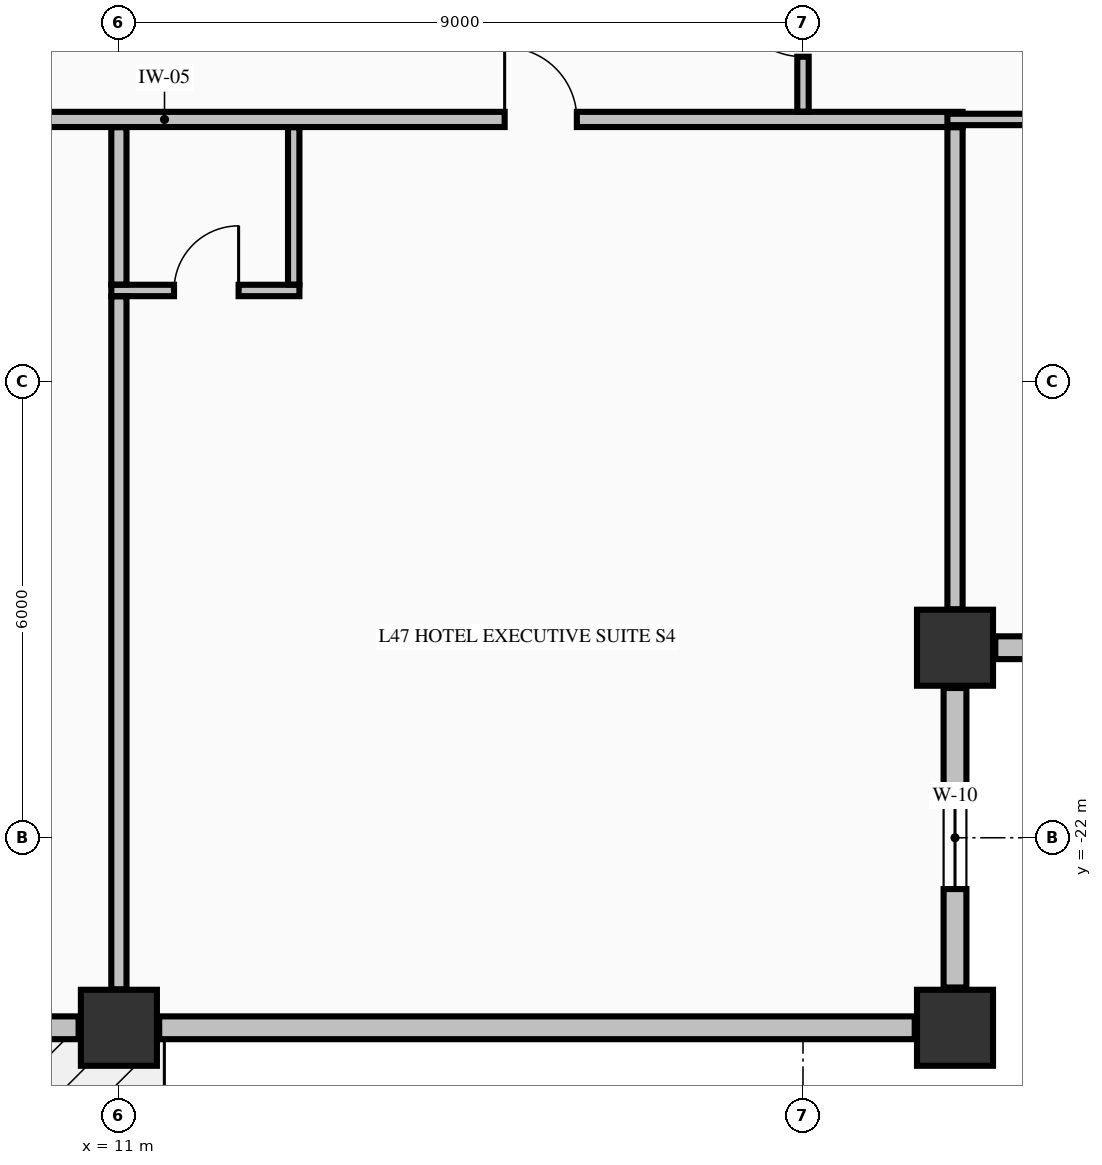
"""IFC4 building model, lengths in metres.
Left out: names, types, materials, properties, quantities, classifications, styles, units other than length and angle.
Written with IfcOpenShell. Run it as: python <this file> out.ifc"""

import sys

from ifc_helpers import new_model, si_unit, direction, frame, frame_2d, origin, origin_2d, place, context, subcontext, project, spatial, rectangle, extrude, element, fill, save


model = new_model("IFC4")
c1 = context("Model", 3, precision=1e-05, world=origin(), true_north=direction((0.0, 1.0)))
c2 = subcontext(c1, "Body", "Model", "MODEL_VIEW")
j1 = project(units=[si_unit("LENGTHUNIT", "METRE"), si_unit("PLANEANGLEUNIT", "RADIAN")], contexts=[c1])
p1 = place(None, origin())
s1 = spatial("IfcSite", under=j1, at=p1, CompositionType="ELEMENT")
p2 = place(p1, origin())
s2 = spatial("IfcBuilding", under=s1, at=p2, CompositionType="ELEMENT")
p3 = place(p2, frame((0.0, 0.0, 183.06)))
s3 = spatial("IfcBuildingStorey", under=s2, at=p3, CompositionType="ELEMENT", Elevation=183.06)
for number, where, z_axis, x_axis in (
    (1, (11.0, -24.5, -0.25), (0.0, 0.0, 1.0), (1.0, 0.0, 0.0)),
    (2, (22.0, -24.5, -0.25), (0.0, 0.0, 1.0), (1.0, 0.0, 0.0)),
    (3, (22.0, -19.5, -0.25), (0.0, 0.0, 1.0), (1.0, 0.0, 0.0)),
):
    element("IfcColumn", number, at=place(p3, frame(where, z_axis=z_axis, x_axis=x_axis)), inside=s3, PredefinedType="COLUMN", context=c2, shape_type="SweptSolid", body=[
        extrude(rectangle(XDim=1.0, YDim=1.0, at=origin_2d()), origin(), (0.0, 0.0, 1.0), 3.225),
    ])
p4 = place(p3, frame((22.0, -23.97, 0.0), z_axis=(0.0, 0.0, 1.0), x_axis=(0.0, 1.0, 0.0)))
e4 = element("IfcWall", 4, at=p4, inside=s3, PredefinedType="STANDARD", context=c2, shape_type="SweptSolid", body=[
    extrude(rectangle(XDim=3.94, YDim=0.3, at=frame_2d((1.97, 0.0))), origin(), (0.0, 0.0, 1.0), 2.367),
])
p5 = place(p4, frame((1.295, 0.0, 0.68)))
e5 = element("IfcOpeningElement", 5, at=p5, cuts=e4, PredefinedType="OPENING", context=c2, shape_type="SweptSolid", body=[
    extrude(rectangle(XDim=1.35, YDim=1.42, at=frame_2d((0.675, 0.71))), frame((0.0, 0.16, 0.0), z_axis=(0.0, -1.0, 0.0), x_axis=(1.0, 0.0, 0.0)), (0.0, 0.0, 1.0), 0.32),
])
p6 = place(p3, frame((22.53, -19.5, 0.0), z_axis=(0.0, 0.0, 1.0), x_axis=(1.0, 0.0, 0.0)))
e6 = element("IfcWall", 6, at=p6, inside=s3, PredefinedType="STANDARD", context=c2, shape_type="SweptSolid", body=[
    extrude(rectangle(XDim=3.94, YDim=0.3, at=frame_2d((1.97, 0.0))), origin(), (0.0, 0.0, 1.0), 2.367),
])
p7 = place(p6, frame((1.295, 0.0, 0.68)))
e7 = element("IfcOpeningElement", 7, at=p7, cuts=e6, PredefinedType="OPENING", context=c2, shape_type="SweptSolid", body=[
    extrude(rectangle(XDim=1.35, YDim=1.42, at=frame_2d((0.675, 0.71))), frame((0.0, 0.16, 0.0), z_axis=(0.0, -1.0, 0.0), x_axis=(1.0, 0.0, 0.0)), (0.0, 0.0, 1.0), 0.32),
])
for number, where, z_axis, x_axis in (
    (8, (0.53, -24.5, 0.0), (0.0, 0.0, 1.0), (1.0, 0.0, 0.0)),
    (9, (11.53, -24.5, 0.0), (0.0, 0.0, 1.0), (1.0, 0.0, 0.0)),
):
    element("IfcWall", number, at=place(p3, frame(where, z_axis=z_axis, x_axis=x_axis)), inside=s3, PredefinedType="STANDARD", context=c2, shape_type="SweptSolid", body=[
        extrude(rectangle(XDim=9.94, YDim=0.3, at=frame_2d((4.97, 0.0))), origin(), (0.0, 0.0, 1.0), 2.367),
    ])
p8 = place(p3, frame((10.9, -14.8, 0.0), z_axis=(0.0, 0.0, 1.0), x_axis=(1.0, 0.0, 0.0)))
e10 = element("IfcWall", 10, at=p8, inside=s3, PredefinedType="PARTITIONING", context=c2, shape_type="SweptSolid", body=[
    extrude(rectangle(XDim=2.475, YDim=0.15, at=frame_2d((1.238, 0.0))), origin(), (0.0, 0.0, 1.0), 2.975),
])
p9 = place(p8, frame((0.825, 0.0, 0.0)))
e11 = element("IfcOpeningElement", 11, at=p9, cuts=e10, PredefinedType="OPENING", context=c2, shape_type="SweptSolid", body=[
    extrude(rectangle(XDim=0.85, YDim=2.1, at=frame_2d((0.425, 1.05))), frame((0.0, 0.085, 0.0), z_axis=(0.0, -1.0, 0.0), x_axis=(1.0, 0.0, 0.0)), (0.0, 0.0, 1.0), 0.17),
])
p10 = place(p3, frame((-17.1, -12.55, 0.0), z_axis=(0.0, 0.0, 1.0), x_axis=(1.0, 0.0, 0.0)))
e12 = element("IfcWall", 12, at=p10, inside=s3, PredefinedType="PARTITIONING", context=c2, shape_type="SweptSolid", body=[
    extrude(rectangle(XDim=39.2, YDim=0.2, at=frame_2d((19.6, 0.0))), origin(), (0.0, 0.0, 1.0), 2.975),
])
p11 = place(p10, frame((6.475, 0.0, 0.0)))
e13 = element("IfcOpeningElement", 13, at=p11, cuts=e12, PredefinedType="OPENING", context=c2, shape_type="SweptSolid", body=[
    extrude(rectangle(XDim=0.95, YDim=2.15, at=frame_2d((0.475, 1.075))), frame((0.0, 0.11, 0.0), z_axis=(0.0, -1.0, 0.0), x_axis=(1.0, 0.0, 0.0)), (0.0, 0.0, 1.0), 0.22),
])
p12 = place(p10, frame((13.525, 0.0, 0.0)))
e14 = element("IfcOpeningElement", 14, at=p12, cuts=e12, PredefinedType="OPENING", context=c2, shape_type="SweptSolid", body=[
    extrude(rectangle(XDim=0.95, YDim=2.15, at=frame_2d((0.475, 1.075))), frame((0.0, 0.11, 0.0), z_axis=(0.0, -1.0, 0.0), x_axis=(1.0, 0.0, 0.0)), (0.0, 0.0, 1.0), 0.22),
])
p13 = place(p10, frame((23.275, 0.0, 0.0)))
e15 = element("IfcOpeningElement", 15, at=p13, cuts=e12, PredefinedType="OPENING", context=c2, shape_type="SweptSolid", body=[
    extrude(rectangle(XDim=0.95, YDim=2.15, at=frame_2d((0.475, 1.075))), frame((0.0, 0.11, 0.0), z_axis=(0.0, -1.0, 0.0), x_axis=(1.0, 0.0, 0.0)), (0.0, 0.0, 1.0), 0.22),
])
p14 = place(p10, frame((33.175, 0.0, 0.0)))
e16 = element("IfcOpeningElement", 16, at=p14, cuts=e12, PredefinedType="OPENING", context=c2, shape_type="SweptSolid", body=[
    extrude(rectangle(XDim=0.95, YDim=2.15, at=frame_2d((0.475, 1.075))), frame((0.0, 0.11, 0.0), z_axis=(0.0, -1.0, 0.0), x_axis=(1.0, 0.0, 0.0)), (0.0, 0.0, 1.0), 0.22),
])
p15 = place(p3, frame((21.9, -12.55, 0.0), z_axis=(0.0, 0.0, 1.0), x_axis=(1.0, 0.0, 0.0)))
e17 = element("IfcWall", 17, at=p15, inside=s3, PredefinedType="PARTITIONING", context=c2, shape_type="SweptSolid", body=[
    extrude(rectangle(XDim=4.935, YDim=0.15, at=frame_2d((2.468, 0.0))), origin(), (0.0, 0.0, 1.0), 2.975),
])
p16 = place(p3, frame((11.0, -23.994, 0.0), z_axis=(0.0, 0.0, 1.0), x_axis=(0.0, 1.0, 0.0)))
e18 = element("IfcWall", 18, at=p16, inside=s3, PredefinedType="PARTITIONING", context=c2, shape_type="SweptSolid", body=[
    extrude(rectangle(XDim=9.116, YDim=0.2, at=frame_2d((4.558, 0.0))), origin(), (0.0, 0.0, 1.0), 2.167),
])
p17 = place(p3, frame((11.0, -14.722, 0.0), z_axis=(0.0, 0.0, 1.0), x_axis=(0.0, 1.0, 0.0)))
e19 = element("IfcWall", 19, at=p17, inside=s3, PredefinedType="PARTITIONING", context=c2, shape_type="SweptSolid", body=[
    extrude(rectangle(XDim=2.069, YDim=0.2, at=frame_2d((1.034, 0.0))), origin(), (0.0, 0.0, 1.0), 2.167),
])
p18 = place(p3, frame((13.3, -14.722, 0.0), z_axis=(0.0, 0.0, 1.0), x_axis=(0.0, 1.0, 0.0)))
e20 = element("IfcWall", 20, at=p18, inside=s3, PredefinedType="PARTITIONING", context=c2, shape_type="SweptSolid", body=[
    extrude(rectangle(XDim=2.069, YDim=0.15, at=frame_2d((1.034, 0.0))), origin(), (0.0, 0.0, 1.0), 2.975),
])
p19 = place(p3, frame((20.0, -12.447, 0.0), z_axis=(0.0, 0.0, 1.0), x_axis=(0.0, 1.0, 0.0)))
e21 = element("IfcWall", 21, at=p19, inside=s3, PredefinedType="PARTITIONING", context=c2, shape_type="SweptSolid", body=[
    extrude(rectangle(XDim=2.066, YDim=0.15, at=frame_2d((1.033, 0.0))), origin(), (0.0, 0.0, 1.0), 2.167),
])
p20 = place(p19, frame((0.722, 0.0, 0.0)))
e22 = element("IfcOpeningElement", 22, at=p20, cuts=e21, PredefinedType="OPENING", context=c2, shape_type="SweptSolid", body=[
    extrude(rectangle(XDim=0.95, YDim=2.02, at=frame_2d((0.475, 1.01))), frame((0.0, 0.085, 0.0), z_axis=(0.0, -1.0, 0.0), x_axis=(1.0, 0.0, 0.0)), (0.0, 0.0, 1.0), 0.17),
])
p21 = place(p3, frame((22.0, -18.994, 0.0), z_axis=(0.0, 0.0, 1.0), x_axis=(0.0, 1.0, 0.0)))
e23 = element("IfcWall", 23, at=p21, inside=s3, PredefinedType="PARTITIONING", context=c2, shape_type="SweptSolid", body=[
    extrude(rectangle(XDim=6.341, YDim=0.2, at=frame_2d((3.17, 0.0))), origin(), (0.0, 0.0, 1.0), 2.975),
])
p22 = place(p5, origin())
e24 = element("IfcWindow", 24, at=p22, inside=s3, PartitioningType="SINGLE_PANEL", PredefinedType="WINDOW", context=c2, shape_type="SweptSolid", body=[
    extrude(rectangle(XDim=1.35, YDim=1.42, at=frame_2d((0.675, 0.71))), frame((0.0, 0.03, 0.0), z_axis=(0.0, -1.0, 0.0), x_axis=(1.0, 0.0, 0.0)), (0.0, 0.0, 1.0), 0.06),
])
fill(e5, e24)
p23 = place(p14, origin())
e25 = element("IfcDoor", 25, at=p23, inside=s3, OperationType="SINGLE_SWING_LEFT", PredefinedType="DOOR", context=c2, shape_type="SweptSolid", body=[
    extrude(rectangle(XDim=0.95, YDim=2.15, at=frame_2d((0.475, 1.075))), frame((0.0, 0.025, 0.0), z_axis=(0.0, -1.0, 0.0), x_axis=(1.0, 0.0, 0.0)), (0.0, 0.0, 1.0), 0.05),
])
fill(e16, e25)
p24 = place(p9, origin())
e26 = element("IfcDoor", 26, at=p24, inside=s3, OperationType="SINGLE_SWING_RIGHT", PredefinedType="DOOR", context=c2, shape_type="SweptSolid", body=[
    extrude(rectangle(XDim=0.85, YDim=2.1, at=frame_2d((0.425, 1.05))), frame((0.0, 0.025, 0.0), z_axis=(0.0, -1.0, 0.0), x_axis=(1.0, 0.0, 0.0)), (0.0, 0.0, 1.0), 0.05),
])
fill(e11, e26)
p25 = place(p20, origin())
e27 = element("IfcDoor", 27, at=p25, inside=s3, OperationType="SINGLE_SWING_RIGHT", PredefinedType="DOOR", context=c2, shape_type="SweptSolid", body=[
    extrude(rectangle(XDim=0.95, YDim=2.02, at=frame_2d((0.475, 1.01))), frame((0.0, 0.025, 0.0), z_axis=(0.0, -1.0, 0.0), x_axis=(1.0, 0.0, 0.0)), (0.0, 0.0, 1.0), 0.05),
])
fill(e22, e27)
save(model, sys.argv[1])
